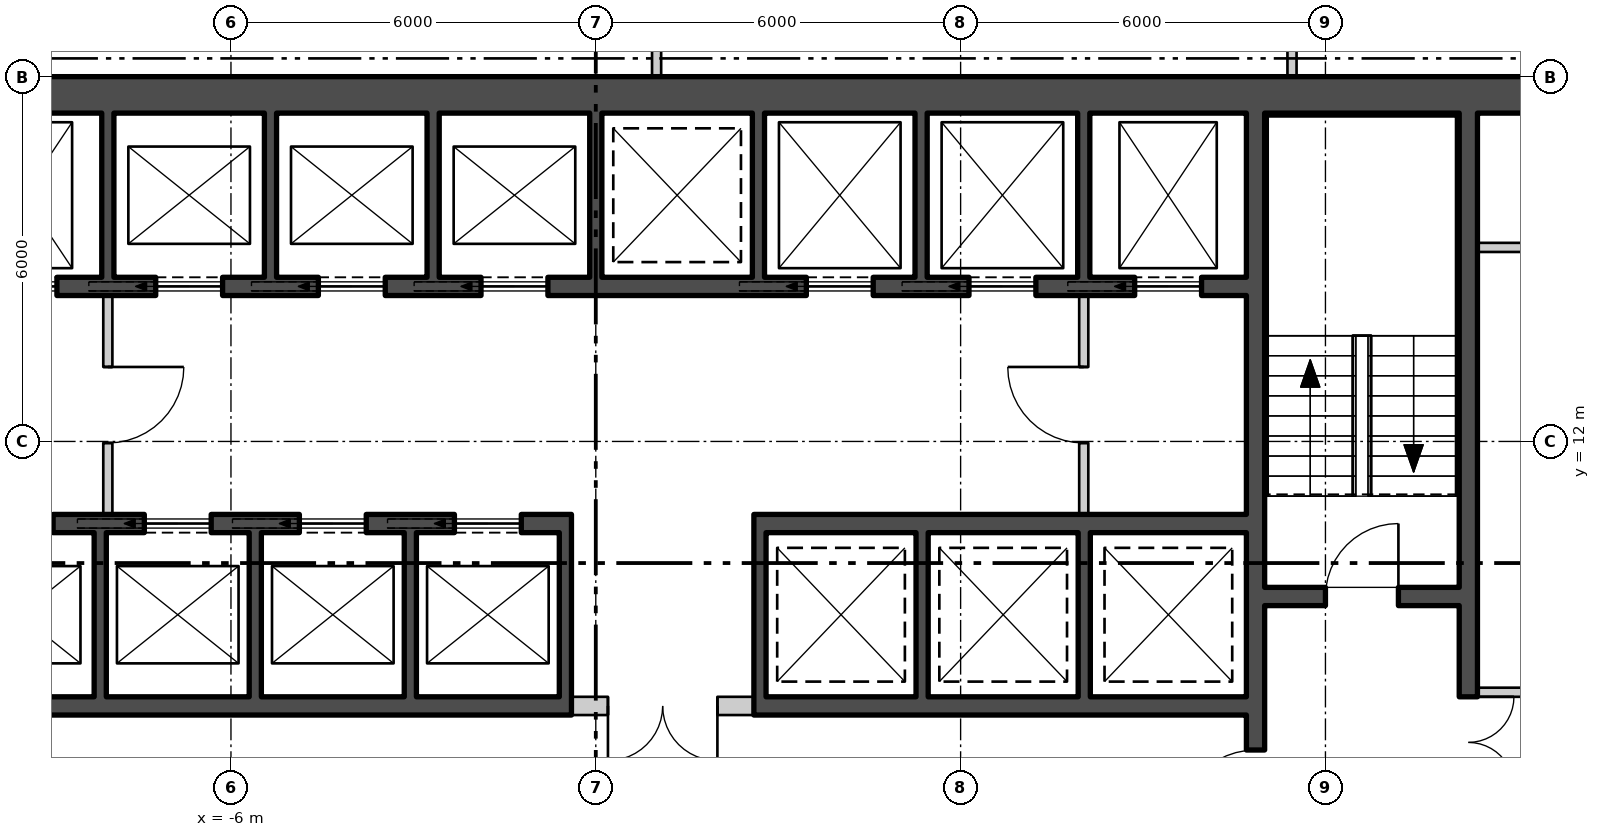
"""IFC4 building model, lengths in metres.
Left out: names, types, materials, properties, quantities, classifications, styles, units other than length and angle.
Written with IfcOpenShell. Run it as: python <this file> out.ifc"""

import sys

from ifc_helpers import new_model, si_unit, direction, frame, frame_2d, origin, place, context, subcontext, project, spatial, rectangle, extrude, element, fill, save


model = new_model("IFC4")
c1 = context("Model", 3, precision=1e-05, world=origin(), true_north=direction((0.0, 1.0)))
c2 = subcontext(c1, "Body", "Model", "MODEL_VIEW")
j1 = project(units=[si_unit("LENGTHUNIT", "METRE"), si_unit("PLANEANGLEUNIT", "RADIAN")], contexts=[c1])
p1 = place(None, origin())
s1 = spatial("IfcSite", under=j1, at=p1, CompositionType="ELEMENT")
p2 = place(p1, origin())
s2 = spatial("IfcBuilding", under=s1, at=p2, CompositionType="ELEMENT")
p3 = place(p2, frame((0.0, 0.0, 23.7)))
s3 = spatial("IfcBuildingStorey", under=s2, at=p3, CompositionType="ELEMENT", Elevation=23.7)
p4 = place(p3, frame((-17.5, 17.7, 0.0), z_axis=(0.0, 0.0, 1.0), x_axis=(1.0, 0.0, 0.0)))
e1 = element("IfcWall", 1, at=p4, inside=s3, PredefinedType="SHEAR", context=c2, shape_type="SweptSolid", body=[
    extrude(rectangle(XDim=35.0, YDim=0.6, at=frame_2d((17.5, 0.0))), origin(), (0.0, 0.0, 1.0), 4.85),
])
p5 = place(p3, frame((10.85, 0.6, 0.0), z_axis=(0.0, 0.0, 1.0), x_axis=(0.0, 1.0, 0.0)))
e2 = element("IfcWall", 2, at=p5, inside=s3, PredefinedType="SHEAR", context=c2, shape_type="SweptSolid", body=[
    extrude(rectangle(XDim=16.8, YDim=0.3, at=frame_2d((8.4, 0.0))), origin(), (0.0, 0.0, 1.0), 4.85),
])
p6 = place(p5, frame((5.075, 0.0, 0.0)))
e3 = element("IfcOpeningElement", 3, at=p6, cuts=e2, PredefinedType="OPENING", context=c2, shape_type="SweptSolid", body=[
    extrude(rectangle(XDim=1.25, YDim=2.1, at=frame_2d((0.625, 1.05))), frame((0.0, 0.16, 0.0), z_axis=(0.0, -1.0, 0.0), x_axis=(1.0, 0.0, 0.0)), (0.0, 0.0, 1.0), 0.32),
])
p7 = place(p5, frame((1.525, 0.0, 0.0)))
e4 = element("IfcOpeningElement", 4, at=p7, cuts=e2, PredefinedType="OPENING", context=c2, shape_type="SweptSolid", body=[
    extrude(rectangle(XDim=1.0, YDim=2.1, at=frame_2d((0.5, 1.05))), frame((0.0, 0.16, 0.0), z_axis=(0.0, -1.0, 0.0), x_axis=(1.0, 0.0, 0.0)), (0.0, 0.0, 1.0), 0.32),
])
p8 = place(p3, frame((14.35, 0.6, 0.0), z_axis=(0.0, 0.0, 1.0), x_axis=(0.0, 1.0, 0.0)))
e5 = element("IfcWall", 5, at=p8, inside=s3, PredefinedType="SHEAR", context=c2, shape_type="SweptSolid", body=[
    extrude(rectangle(XDim=16.8, YDim=0.3, at=frame_2d((8.4, 0.0))), origin(), (0.0, 0.0, 1.0), 4.85),
])
p9 = place(p8, frame((5.7, 0.0, 0.0)))
e6 = element("IfcOpeningElement", 6, at=p9, cuts=e5, PredefinedType="OPENING", context=c2, shape_type="SweptSolid", body=[
    extrude(rectangle(XDim=1.5, YDim=2.1, at=frame_2d((0.75, 1.05))), frame((0.0, 0.16, 0.0), z_axis=(0.0, -1.0, 0.0), x_axis=(1.0, 0.0, 0.0)), (0.0, 0.0, 1.0), 0.32),
])
p10 = place(p3, frame((11.0, 9.45, 0.0), z_axis=(0.0, 0.0, 1.0), x_axis=(1.0, 0.0, 0.0)))
e7 = element("IfcWall", 7, at=p10, inside=s3, PredefinedType="SHEAR", context=c2, shape_type="SweptSolid", body=[
    extrude(rectangle(XDim=3.2, YDim=0.3, at=frame_2d((1.6, 0.0))), origin(), (0.0, 0.0, 1.0), 4.85),
])
p11 = place(p10, frame((1.0, 0.0, 0.0)))
e8 = element("IfcOpeningElement", 8, at=p11, cuts=e7, PredefinedType="OPENING", context=c2, shape_type="SweptSolid", body=[
    extrude(rectangle(XDim=1.2, YDim=2.1, at=frame_2d((0.6, 1.05))), frame((0.0, 0.16, 0.0), z_axis=(0.0, -1.0, 0.0), x_axis=(1.0, 0.0, 0.0)), (0.0, 0.0, 1.0), 0.32),
])
p12 = place(p3, frame((-10.7, 14.55, 0.0), z_axis=(0.0, 0.0, 1.0), x_axis=(1.0, 0.0, 0.0)))
e9 = element("IfcWall", 9, at=p12, inside=s3, PredefinedType="SHEAR", context=c2, shape_type="SweptSolid", body=[
    extrude(rectangle(XDim=21.4, YDim=0.3, at=frame_2d((10.7, 0.0))), origin(), (0.0, 0.0, 1.0), 4.85),
])
p13 = place(p12, frame((0.738, 0.0, 0.0)))
e10 = element("IfcOpeningElement", 10, at=p13, cuts=e9, PredefinedType="OPENING", context=c2, shape_type="SweptSolid", body=[
    extrude(rectangle(XDim=1.1, YDim=2.1, at=frame_2d((0.55, 1.05))), frame((0.0, 0.16, 0.0), z_axis=(0.0, -1.0, 0.0), x_axis=(1.0, 0.0, 0.0)), (0.0, 0.0, 1.0), 0.32),
])
p14 = place(p12, frame((3.462, 0.0, 0.0)))
e11 = element("IfcOpeningElement", 11, at=p14, cuts=e9, PredefinedType="OPENING", context=c2, shape_type="SweptSolid", body=[
    extrude(rectangle(XDim=1.1, YDim=2.1, at=frame_2d((0.55, 1.05))), frame((0.0, 0.16, 0.0), z_axis=(0.0, -1.0, 0.0), x_axis=(1.0, 0.0, 0.0)), (0.0, 0.0, 1.0), 0.32),
])
p15 = place(p12, frame((6.138, 0.0, 0.0)))
e12 = element("IfcOpeningElement", 12, at=p15, cuts=e9, PredefinedType="OPENING", context=c2, shape_type="SweptSolid", body=[
    extrude(rectangle(XDim=1.1, YDim=2.1, at=frame_2d((0.55, 1.05))), frame((0.0, 0.16, 0.0), z_axis=(0.0, -1.0, 0.0), x_axis=(1.0, 0.0, 0.0)), (0.0, 0.0, 1.0), 0.32),
])
p16 = place(p12, frame((8.812, 0.0, 0.0)))
e13 = element("IfcOpeningElement", 13, at=p16, cuts=e9, PredefinedType="OPENING", context=c2, shape_type="SweptSolid", body=[
    extrude(rectangle(XDim=1.1, YDim=2.1, at=frame_2d((0.55, 1.05))), frame((0.0, 0.16, 0.0), z_axis=(0.0, -1.0, 0.0), x_axis=(1.0, 0.0, 0.0)), (0.0, 0.0, 1.0), 0.32),
])
p17 = place(p12, frame((14.162, 0.0, 0.0)))
e14 = element("IfcOpeningElement", 14, at=p17, cuts=e9, PredefinedType="OPENING", context=c2, shape_type="SweptSolid", body=[
    extrude(rectangle(XDim=1.1, YDim=2.1, at=frame_2d((0.55, 1.05))), frame((0.0, 0.16, 0.0), z_axis=(0.0, -1.0, 0.0), x_axis=(1.0, 0.0, 0.0)), (0.0, 0.0, 1.0), 0.32),
])
p18 = place(p12, frame((16.837, 0.0, 0.0)))
e15 = element("IfcOpeningElement", 15, at=p18, cuts=e9, PredefinedType="OPENING", context=c2, shape_type="SweptSolid", body=[
    extrude(rectangle(XDim=1.1, YDim=2.1, at=frame_2d((0.55, 1.05))), frame((0.0, 0.16, 0.0), z_axis=(0.0, -1.0, 0.0), x_axis=(1.0, 0.0, 0.0)), (0.0, 0.0, 1.0), 0.32),
])
p19 = place(p12, frame((19.562, 0.0, 0.0)))
e16 = element("IfcOpeningElement", 16, at=p19, cuts=e9, PredefinedType="OPENING", context=c2, shape_type="SweptSolid", body=[
    extrude(rectangle(XDim=1.1, YDim=2.1, at=frame_2d((0.55, 1.05))), frame((0.0, 0.16, 0.0), z_axis=(0.0, -1.0, 0.0), x_axis=(1.0, 0.0, 0.0)), (0.0, 0.0, 1.0), 0.32),
])
p20 = place(p3, frame((-10.7, 10.65, 0.0), z_axis=(0.0, 0.0, 1.0), x_axis=(1.0, 0.0, 0.0)))
e17 = element("IfcWall", 17, at=p20, inside=s3, PredefinedType="SHEAR", context=c2, shape_type="SweptSolid", body=[
    extrude(rectangle(XDim=10.3, YDim=0.3, at=frame_2d((5.15, 0.0))), origin(), (0.0, 0.0, 1.0), 4.85),
])
p21 = place(p20, frame((0.675, 0.0, 0.0)))
e18 = element("IfcOpeningElement", 18, at=p21, cuts=e17, PredefinedType="OPENING", context=c2, shape_type="SweptSolid", body=[
    extrude(rectangle(XDim=1.1, YDim=2.1, at=frame_2d((0.55, 1.05))), frame((0.0, 0.16, 0.0), z_axis=(0.0, -1.0, 0.0), x_axis=(1.0, 0.0, 0.0)), (0.0, 0.0, 1.0), 0.32),
])
p22 = place(p20, frame((3.275, 0.0, 0.0)))
e19 = element("IfcOpeningElement", 19, at=p22, cuts=e17, PredefinedType="OPENING", context=c2, shape_type="SweptSolid", body=[
    extrude(rectangle(XDim=1.1, YDim=2.1, at=frame_2d((0.55, 1.05))), frame((0.0, 0.16, 0.0), z_axis=(0.0, -1.0, 0.0), x_axis=(1.0, 0.0, 0.0)), (0.0, 0.0, 1.0), 0.32),
])
p23 = place(p20, frame((5.825, 0.0, 0.0)))
e20 = element("IfcOpeningElement", 20, at=p23, cuts=e17, PredefinedType="OPENING", context=c2, shape_type="SweptSolid", body=[
    extrude(rectangle(XDim=1.1, YDim=2.1, at=frame_2d((0.55, 1.05))), frame((0.0, 0.16, 0.0), z_axis=(0.0, -1.0, 0.0), x_axis=(1.0, 0.0, 0.0)), (0.0, 0.0, 1.0), 0.32),
])
p24 = place(p20, frame((8.375, 0.0, 0.0)))
e21 = element("IfcOpeningElement", 21, at=p24, cuts=e17, PredefinedType="OPENING", context=c2, shape_type="SweptSolid", body=[
    extrude(rectangle(XDim=1.1, YDim=2.1, at=frame_2d((0.55, 1.05))), frame((0.0, 0.16, 0.0), z_axis=(0.0, -1.0, 0.0), x_axis=(1.0, 0.0, 0.0)), (0.0, 0.0, 1.0), 0.32),
])
p25 = place(p3, frame((-10.7, 7.65, 0.0), z_axis=(0.0, 0.0, 1.0), x_axis=(1.0, 0.0, 0.0)))
e22 = element("IfcWall", 22, at=p25, inside=s3, PredefinedType="SHEAR", context=c2, shape_type="SweptSolid", body=[
    extrude(rectangle(XDim=10.3, YDim=0.3, at=frame_2d((5.15, 0.0))), origin(), (0.0, 0.0, 1.0), 4.85),
])
for number, where, z_axis, x_axis in (
    (23, (2.6, 10.65, 0.0), (0.0, 0.0, 1.0), (1.0, 0.0, 0.0)),
    (24, (2.6, 7.65, 0.0), (0.0, 0.0, 1.0), (1.0, 0.0, 0.0)),
):
    element("IfcWall", number, at=place(p3, frame(where, z_axis=z_axis, x_axis=x_axis)), inside=s3, PredefinedType="SHEAR", context=c2, shape_type="SweptSolid", body=[
        extrude(rectangle(XDim=8.1, YDim=0.3, at=frame_2d((4.05, 0.0))), origin(), (0.0, 0.0, 1.0), 4.85),
    ])
for number, where, z_axis, x_axis in (
    (25, (-8.025, 14.7, 0.0), (0.0, 0.0, 1.0), (0.0, 1.0, 0.0)),
    (26, (-5.35, 14.7, 0.0), (0.0, 0.0, 1.0), (0.0, 1.0, 0.0)),
    (27, (-2.675, 14.7, 0.0), (0.0, 0.0, 1.0), (0.0, 1.0, 0.0)),
    (28, (0.0, 14.7, 0.0), (0.0, 0.0, 1.0), (0.0, 1.0, 0.0)),
    (29, (2.675, 14.7, 0.0), (0.0, 0.0, 1.0), (0.0, 1.0, 0.0)),
    (30, (5.35, 14.7, 0.0), (0.0, 0.0, 1.0), (0.0, 1.0, 0.0)),
    (31, (8.025, 14.7, 0.0), (0.0, 0.0, 1.0), (0.0, 1.0, 0.0)),
    (32, (-8.15, 7.8, 0.0), (0.0, 0.0, 1.0), (0.0, 1.0, 0.0)),
    (33, (-5.6, 7.8, 0.0), (0.0, 0.0, 1.0), (0.0, 1.0, 0.0)),
    (34, (-3.05, 7.8, 0.0), (0.0, 0.0, 1.0), (0.0, 1.0, 0.0)),
    (35, (-0.5, 7.8, 0.0), (0.0, 0.0, 1.0), (0.0, 1.0, 0.0)),
    (36, (2.7, 7.8, 0.0), (0.0, 0.0, 1.0), (0.0, 1.0, 0.0)),
    (37, (5.367, 7.8, 0.0), (0.0, 0.0, 1.0), (0.0, 1.0, 0.0)),
    (38, (8.033, 7.8, 0.0), (0.0, 0.0, 1.0), (0.0, 1.0, 0.0)),
):
    element("IfcWall", number, at=place(p3, frame(where, z_axis=z_axis, x_axis=x_axis)), inside=s3, PredefinedType="SHEAR", context=c2, shape_type="SweptSolid", body=[
        extrude(rectangle(XDim=2.7, YDim=0.2, at=frame_2d((1.35, 0.0))), origin(), (0.0, 0.0, 1.0), 4.85),
    ])
p26 = place(p3, frame((-8.025, 10.8, 0.0), z_axis=(0.0, 0.0, 1.0), x_axis=(0.0, 1.0, 0.0)))
e39 = element("IfcWall", 39, at=p26, inside=s3, PredefinedType="PARTITIONING", context=c2, shape_type="SweptSolid", body=[
    extrude(rectangle(XDim=3.6, YDim=0.15, at=frame_2d((1.8, 0.0))), origin(), (0.0, 0.0, 1.0), 4.85),
])
p27 = place(p26, frame((1.175, 0.0, 0.0)))
e40 = element("IfcOpeningElement", 40, at=p27, cuts=e39, PredefinedType="OPENING", context=c2, shape_type="SweptSolid", body=[
    extrude(rectangle(XDim=1.25, YDim=2.1, at=frame_2d((0.625, 1.05))), frame((0.0, 0.085, 0.0), z_axis=(0.0, -1.0, 0.0), x_axis=(1.0, 0.0, 0.0)), (0.0, 0.0, 1.0), 0.17),
])
p28 = place(p3, frame((8.025, 10.8, 0.0), z_axis=(0.0, 0.0, 1.0), x_axis=(0.0, 1.0, 0.0)))
e41 = element("IfcWall", 41, at=p28, inside=s3, PredefinedType="PARTITIONING", context=c2, shape_type="SweptSolid", body=[
    extrude(rectangle(XDim=3.6, YDim=0.15, at=frame_2d((1.8, 0.0))), origin(), (0.0, 0.0, 1.0), 4.85),
])
p29 = place(p28, frame((1.175, 0.0, 0.0)))
e42 = element("IfcOpeningElement", 42, at=p29, cuts=e41, PredefinedType="OPENING", context=c2, shape_type="SweptSolid", body=[
    extrude(rectangle(XDim=1.25, YDim=2.1, at=frame_2d((0.625, 1.05))), frame((0.0, 0.085, 0.0), z_axis=(0.0, -1.0, 0.0), x_axis=(1.0, 0.0, 0.0)), (0.0, 0.0, 1.0), 0.17),
])
for number, where, z_axis, x_axis in (
    (43, (14.5, 7.875, 0.0), (0.0, 0.0, 1.0), (1.0, 0.0, 0.0)),
    (44, (14.5, 15.191, 0.0), (0.0, 0.0, 1.0), (1.0, 0.0, 0.0)),
):
    element("IfcWall", number, at=place(p3, frame(where, z_axis=z_axis, x_axis=x_axis)), inside=s3, PredefinedType="PARTITIONING", context=c2, shape_type="SweptSolid", body=[
        extrude(rectangle(XDim=2.4, YDim=0.15, at=frame_2d((1.2, 0.0))), origin(), (0.0, 0.0, 1.0), 4.85),
    ])
p30 = place(p3, frame((-0.4, 7.65, 0.0), z_axis=(0.0, 0.0, 1.0), x_axis=(1.0, 0.0, 0.0)))
e45 = element("IfcWall", 45, at=p30, inside=s3, PredefinedType="PARTITIONING", context=c2, shape_type="SweptSolid", body=[
    extrude(rectangle(XDim=3.0, YDim=0.3, at=frame_2d((1.5, 0.0))), origin(), (0.0, 0.0, 1.0), 4.85),
])
p31 = place(p30, frame((0.6, 0.0, 0.0)))
e46 = element("IfcOpeningElement", 46, at=p31, cuts=e45, PredefinedType="OPENING", context=c2, shape_type="SweptSolid", body=[
    extrude(rectangle(XDim=1.8, YDim=2.4, at=frame_2d((0.9, 1.2))), frame((0.0, 0.16, 0.0), z_axis=(0.0, -1.0, 0.0), x_axis=(1.0, 0.0, 0.0)), (0.0, 0.0, 1.0), 0.32),
])
for number, where, z_axis, x_axis in (
    (47, (1.0, 18.0, 0.0), (0.0, 0.0, 1.0), (0.0, 1.0, 0.0)),
    (48, (11.45, 18.0, 0.0), (0.0, 0.0, 1.0), (0.0, 1.0, 0.0)),
):
    element("IfcWall", number, at=place(p3, frame(where, z_axis=z_axis, x_axis=x_axis)), inside=s3, PredefinedType="PARTITIONING", context=c2, shape_type="SweptSolid", body=[
        extrude(rectangle(XDim=1.75, YDim=0.15, at=frame_2d((0.875, 0.0))), origin(), (0.0, 0.0, 1.0), 4.85),
    ])
p32 = place(p13, origin())
e49 = element("IfcDoor", 49, at=p32, inside=s3, OperationType="SLIDING_TO_LEFT", PredefinedType="DOOR", context=c2, shape_type="SweptSolid", body=[
    extrude(rectangle(XDim=1.1, YDim=2.1, at=frame_2d((0.55, 1.05))), frame((0.0, 0.025, 0.0), z_axis=(0.0, -1.0, 0.0), x_axis=(1.0, 0.0, 0.0)), (0.0, 0.0, 1.0), 0.05),
])
fill(e10, e49)
p33 = place(p14, origin())
e50 = element("IfcDoor", 50, at=p33, inside=s3, OperationType="SLIDING_TO_LEFT", PredefinedType="DOOR", context=c2, shape_type="SweptSolid", body=[
    extrude(rectangle(XDim=1.1, YDim=2.1, at=frame_2d((0.55, 1.05))), frame((0.0, 0.025, 0.0), z_axis=(0.0, -1.0, 0.0), x_axis=(1.0, 0.0, 0.0)), (0.0, 0.0, 1.0), 0.05),
])
fill(e11, e50)
p34 = place(p15, origin())
e51 = element("IfcDoor", 51, at=p34, inside=s3, OperationType="SLIDING_TO_LEFT", PredefinedType="DOOR", context=c2, shape_type="SweptSolid", body=[
    extrude(rectangle(XDim=1.1, YDim=2.1, at=frame_2d((0.55, 1.05))), frame((0.0, 0.025, 0.0), z_axis=(0.0, -1.0, 0.0), x_axis=(1.0, 0.0, 0.0)), (0.0, 0.0, 1.0), 0.05),
])
fill(e12, e51)
p35 = place(p16, origin())
e52 = element("IfcDoor", 52, at=p35, inside=s3, OperationType="SLIDING_TO_LEFT", PredefinedType="DOOR", context=c2, shape_type="SweptSolid", body=[
    extrude(rectangle(XDim=1.1, YDim=2.1, at=frame_2d((0.55, 1.05))), frame((0.0, 0.025, 0.0), z_axis=(0.0, -1.0, 0.0), x_axis=(1.0, 0.0, 0.0)), (0.0, 0.0, 1.0), 0.05),
])
fill(e13, e52)
p36 = place(p17, origin())
e53 = element("IfcDoor", 53, at=p36, inside=s3, OperationType="SLIDING_TO_LEFT", PredefinedType="DOOR", context=c2, shape_type="SweptSolid", body=[
    extrude(rectangle(XDim=1.1, YDim=2.1, at=frame_2d((0.55, 1.05))), frame((0.0, 0.025, 0.0), z_axis=(0.0, -1.0, 0.0), x_axis=(1.0, 0.0, 0.0)), (0.0, 0.0, 1.0), 0.05),
])
fill(e14, e53)
p37 = place(p18, origin())
e54 = element("IfcDoor", 54, at=p37, inside=s3, OperationType="SLIDING_TO_LEFT", PredefinedType="DOOR", context=c2, shape_type="SweptSolid", body=[
    extrude(rectangle(XDim=1.1, YDim=2.1, at=frame_2d((0.55, 1.05))), frame((0.0, 0.025, 0.0), z_axis=(0.0, -1.0, 0.0), x_axis=(1.0, 0.0, 0.0)), (0.0, 0.0, 1.0), 0.05),
])
fill(e15, e54)
p38 = place(p19, origin())
e55 = element("IfcDoor", 55, at=p38, inside=s3, OperationType="SLIDING_TO_LEFT", PredefinedType="DOOR", context=c2, shape_type="SweptSolid", body=[
    extrude(rectangle(XDim=1.1, YDim=2.1, at=frame_2d((0.55, 1.05))), frame((0.0, 0.025, 0.0), z_axis=(0.0, -1.0, 0.0), x_axis=(1.0, 0.0, 0.0)), (0.0, 0.0, 1.0), 0.05),
])
fill(e16, e55)
p39 = place(p21, origin())
e56 = element("IfcDoor", 56, at=p39, inside=s3, OperationType="SLIDING_TO_LEFT", PredefinedType="DOOR", context=c2, shape_type="SweptSolid", body=[
    extrude(rectangle(XDim=1.1, YDim=2.1, at=frame_2d((0.55, 1.05))), frame((0.0, 0.025, 0.0), z_axis=(0.0, -1.0, 0.0), x_axis=(1.0, 0.0, 0.0)), (0.0, 0.0, 1.0), 0.05),
])
fill(e18, e56)
p40 = place(p22, origin())
e57 = element("IfcDoor", 57, at=p40, inside=s3, OperationType="SLIDING_TO_LEFT", PredefinedType="DOOR", context=c2, shape_type="SweptSolid", body=[
    extrude(rectangle(XDim=1.1, YDim=2.1, at=frame_2d((0.55, 1.05))), frame((0.0, 0.025, 0.0), z_axis=(0.0, -1.0, 0.0), x_axis=(1.0, 0.0, 0.0)), (0.0, 0.0, 1.0), 0.05),
])
fill(e19, e57)
p41 = place(p23, origin())
e58 = element("IfcDoor", 58, at=p41, inside=s3, OperationType="SLIDING_TO_LEFT", PredefinedType="DOOR", context=c2, shape_type="SweptSolid", body=[
    extrude(rectangle(XDim=1.1, YDim=2.1, at=frame_2d((0.55, 1.05))), frame((0.0, 0.025, 0.0), z_axis=(0.0, -1.0, 0.0), x_axis=(1.0, 0.0, 0.0)), (0.0, 0.0, 1.0), 0.05),
])
fill(e20, e58)
p42 = place(p24, origin())
e59 = element("IfcDoor", 59, at=p42, inside=s3, OperationType="SLIDING_TO_LEFT", PredefinedType="DOOR", context=c2, shape_type="SweptSolid", body=[
    extrude(rectangle(XDim=1.1, YDim=2.1, at=frame_2d((0.55, 1.05))), frame((0.0, 0.025, 0.0), z_axis=(0.0, -1.0, 0.0), x_axis=(1.0, 0.0, 0.0)), (0.0, 0.0, 1.0), 0.05),
])
fill(e21, e59)
p43 = place(p27, origin())
e60 = element("IfcDoor", 60, at=p43, inside=s3, OperationType="SINGLE_SWING_RIGHT", PredefinedType="DOOR", context=c2, shape_type="SweptSolid", body=[
    extrude(rectangle(XDim=1.25, YDim=2.1, at=frame_2d((0.625, 1.05))), frame((0.0, 0.025, 0.0), z_axis=(0.0, -1.0, 0.0), x_axis=(1.0, 0.0, 0.0)), (0.0, 0.0, 1.0), 0.05),
])
fill(e40, e60)
p44 = place(p29, origin())
e61 = element("IfcDoor", 61, at=p44, inside=s3, OperationType="SINGLE_SWING_LEFT", PredefinedType="DOOR", context=c2, shape_type="SweptSolid", body=[
    extrude(rectangle(XDim=1.25, YDim=2.1, at=frame_2d((0.625, 1.05))), frame((0.0, 0.025, 0.0), z_axis=(0.0, -1.0, 0.0), x_axis=(1.0, 0.0, 0.0)), (0.0, 0.0, 1.0), 0.05),
])
fill(e42, e61)
p45 = place(p11, origin())
e62 = element("IfcDoor", 62, at=p45, inside=s3, OperationType="SINGLE_SWING_LEFT", PredefinedType="DOOR", context=c2, shape_type="SweptSolid", body=[
    extrude(rectangle(XDim=1.2, YDim=2.1, at=frame_2d((0.6, 1.05))), frame((0.0, 0.025, 0.0), z_axis=(0.0, -1.0, 0.0), x_axis=(1.0, 0.0, 0.0)), (0.0, 0.0, 1.0), 0.05),
])
fill(e8, e62)
p46 = place(p6, origin())
e63 = element("IfcDoor", 63, at=p46, inside=s3, OperationType="SINGLE_SWING_RIGHT", PredefinedType="DOOR", context=c2, shape_type="SweptSolid", body=[
    extrude(rectangle(XDim=1.25, YDim=2.1, at=frame_2d((0.625, 1.05))), frame((0.0, 0.025, 0.0), z_axis=(0.0, -1.0, 0.0), x_axis=(1.0, 0.0, 0.0)), (0.0, 0.0, 1.0), 0.05),
])
fill(e3, e63)
p47 = place(p9, origin())
e64 = element("IfcDoor", 64, at=p47, inside=s3, OperationType="DOUBLE_DOOR_SINGLE_SWING", PredefinedType="DOOR", context=c2, shape_type="SweptSolid", body=[
    extrude(rectangle(XDim=1.5, YDim=2.1, at=frame_2d((0.75, 1.05))), frame((0.0, 0.025, 0.0), z_axis=(0.0, -1.0, 0.0), x_axis=(1.0, 0.0, 0.0)), (0.0, 0.0, 1.0), 0.05),
])
fill(e6, e64)
p48 = place(p31, origin())
e65 = element("IfcDoor", 65, at=p48, inside=s3, OperationType="DOUBLE_DOOR_SINGLE_SWING", PredefinedType="DOOR", context=c2, shape_type="SweptSolid", body=[
    extrude(rectangle(XDim=1.8, YDim=2.4, at=frame_2d((0.9, 1.2))), frame((0.0, 0.025, 0.0), z_axis=(0.0, -1.0, 0.0), x_axis=(1.0, 0.0, 0.0)), (0.0, 0.0, 1.0), 0.05),
])
fill(e46, e65)
save(model, sys.argv[1])
